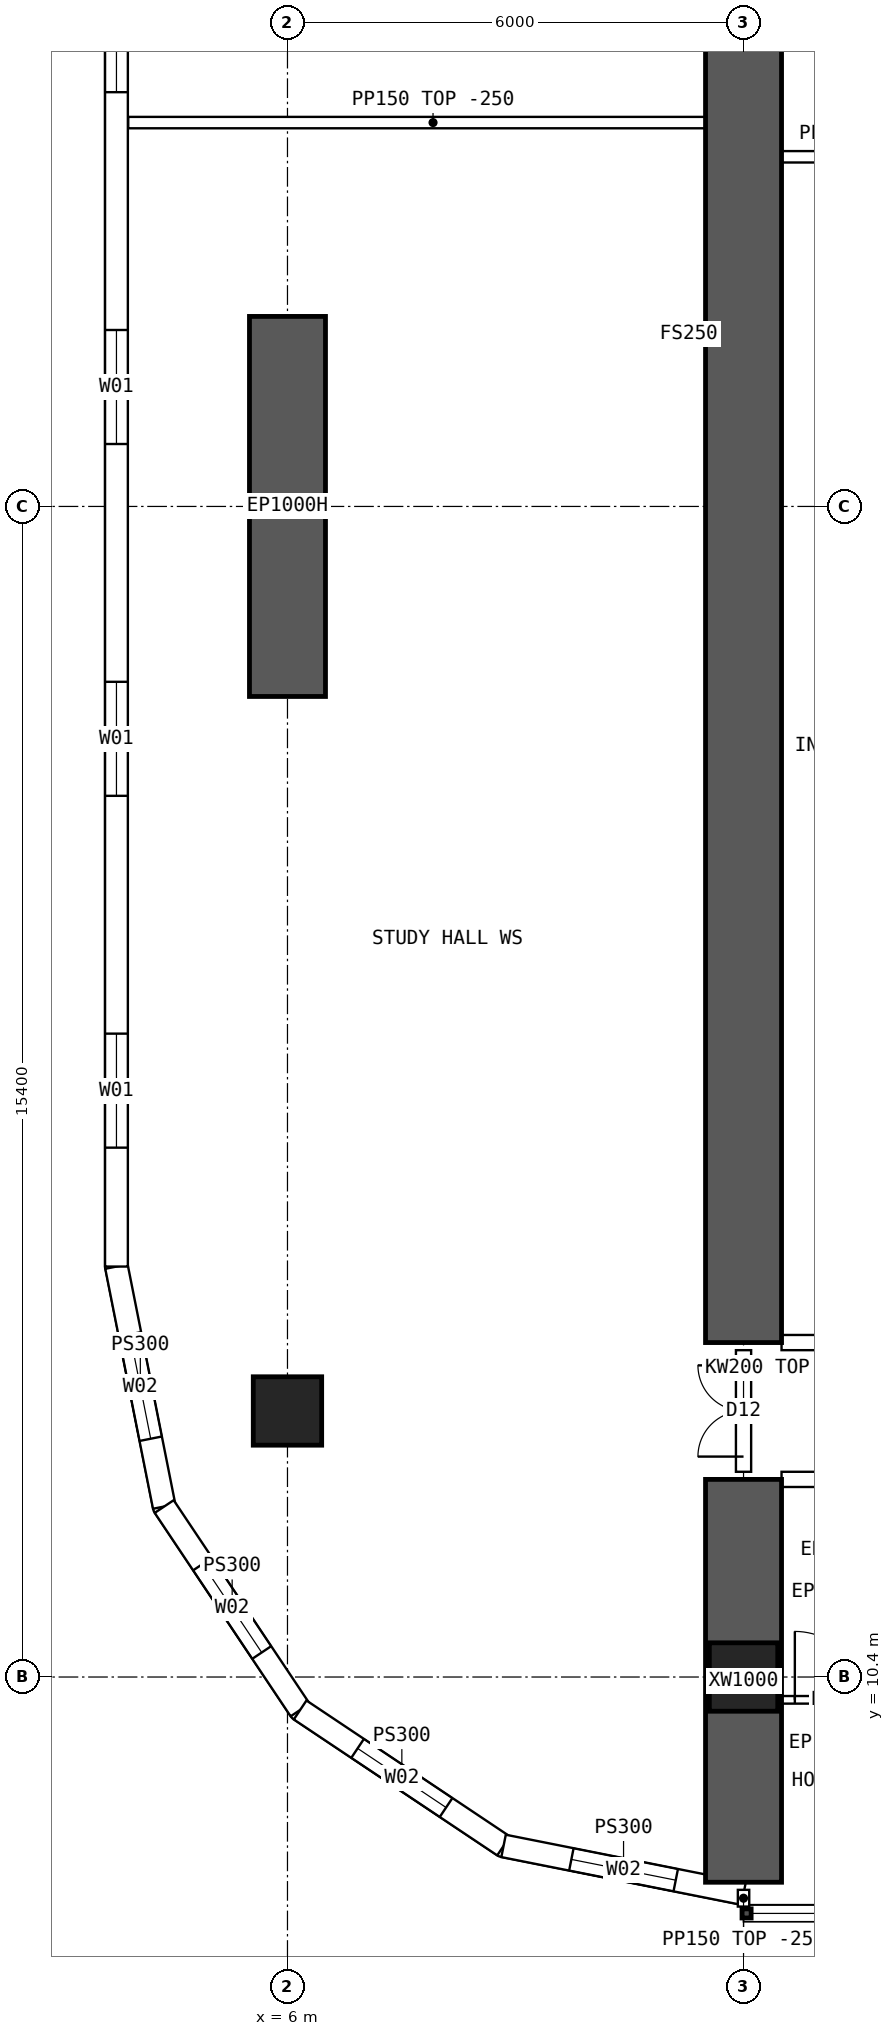
"""IFC4 building model, lengths in metres.
Left out: names, types, materials, properties, quantities, classifications, styles, units other than length and angle.
Written with IfcOpenShell. Run it as: python <this file> out.ifc"""

import sys

from ifc_helpers import new_model, si_unit, direction, frame, frame_2d, origin, origin_2d, place, context, subcontext, project, spatial, polyline, rectangle, hollow_rectangle, outline, extrude, element, fill, save


model = new_model("IFC4")
c1 = context("Model", 3, precision=1e-05, world=origin(), true_north=direction((0.0, 1.0)))
c2 = subcontext(c1, "Body", "Model", "MODEL_VIEW")
j1 = project(units=[si_unit("LENGTHUNIT", "METRE"), si_unit("PLANEANGLEUNIT", "RADIAN")], contexts=[c1])
p1 = place(None, origin())
s1 = spatial("IfcSite", under=j1, at=p1, CompositionType="ELEMENT")
p2 = place(p1, origin())
s2 = spatial("IfcBuilding", under=s1, at=p2, CompositionType="ELEMENT")
p3 = place(p2, frame((0.0, 0.0, 42.7)))
s3 = spatial("IfcBuildingStorey", under=s2, at=p3, CompositionType="ELEMENT", Elevation=42.7)
for number, where, z_axis, x_axis in (
    (1, (12.0, 10.4, 0.0), (0.0, 0.0, 1.0), (1.0, 0.0, 0.0)),
    (2, (6.0, 13.9, 0.0), (0.0, 0.0, 1.0), (1.0, 0.0, 0.0)),
):
    element("IfcColumn", number, at=place(p3, frame(where, z_axis=z_axis, x_axis=x_axis)), inside=s3, PredefinedType="COLUMN", context=c2, shape_type="SweptSolid", body=[
        extrude(hollow_rectangle(XDim=0.9, YDim=0.9, WallThickness=0.09, at=origin_2d()), origin(), (0.0, 0.0, 1.0), 3.75),
    ])
p4 = place(p3, frame((6.0, 23.3, 0.0), z_axis=(0.0, 0.0, 1.0), x_axis=(0.0, 1.0, 0.0)))
e3 = element("IfcWall", 3, at=p4, inside=s3, PredefinedType="SHEAR", context=c2, shape_type="SweptSolid", body=[
    extrude(rectangle(XDim=5.0, YDim=1.0, at=frame_2d((2.5, 0.0))), origin(), (0.0, 0.0, 1.0), 3.75),
])
p5 = place(p3, frame((12.0, 7.7, 0.0), z_axis=(0.0, 0.0, 1.0), x_axis=(0.0, 1.0, 0.0)))
e4 = element("IfcWall", 4, at=p5, inside=s3, PredefinedType="SHEAR", context=c2, shape_type="SweptSolid", body=[
    extrude(rectangle(XDim=5.3, YDim=1.0, at=frame_2d((2.65, 0.0))), origin(), (0.0, 0.0, 1.0), 3.75),
])
p6 = place(p3, frame((12.0, 14.8, 0.0), z_axis=(0.0, 0.0, 1.0), x_axis=(0.0, 1.0, 0.0)))
e5 = element("IfcWall", 5, at=p6, inside=s3, PredefinedType="SHEAR", context=c2, shape_type="SweptSolid", body=[
    extrude(rectangle(XDim=34.4, YDim=1.0, at=frame_2d((17.2, 0.0))), origin(), (0.0, 0.0, 1.0), 3.75),
])
p7 = place(p3, frame((3.75, 48.2, 0.0), z_axis=(0.0, 0.0, 1.0), x_axis=(0.0, -1.0, 0.0)))
e6 = element("IfcWall", 6, at=p7, inside=s3, PredefinedType="SOLIDWALL", context=c2, shape_type="SweptSolid", body=[
    extrude(outline(polyline([(-0.015, -0.15), (32.415, -0.15), (32.385, 0.15), (0.015, 0.15), (-0.015, -0.15)])), origin(), (0.0, 0.0, 1.0), 3.5),
])
p8 = place(p7, frame((1.564, 0.0, 0.9)))
e7 = element("IfcOpeningElement", 7, at=p8, cuts=e6, PredefinedType="OPENING", context=c2, shape_type="SweptSolid", body=[
    extrude(rectangle(XDim=1.5, YDim=2.0, at=frame_2d((0.75, 1.0))), frame((0.0, 0.16, 0.0), z_axis=(0.0, -1.0, 0.0), x_axis=(1.0, 0.0, 0.0)), (0.0, 0.0, 1.0), 0.32),
])
p9 = place(p7, frame((6.193, 0.0, 0.9)))
e8 = element("IfcOpeningElement", 8, at=p9, cuts=e6, PredefinedType="OPENING", context=c2, shape_type="SweptSolid", body=[
    extrude(rectangle(XDim=1.5, YDim=2.0, at=frame_2d((0.75, 1.0))), frame((0.0, 0.16, 0.0), z_axis=(0.0, -1.0, 0.0), x_axis=(1.0, 0.0, 0.0)), (0.0, 0.0, 1.0), 0.32),
])
p10 = place(p7, frame((10.822, 0.0, 0.9)))
e9 = element("IfcOpeningElement", 9, at=p10, cuts=e6, PredefinedType="OPENING", context=c2, shape_type="SweptSolid", body=[
    extrude(rectangle(XDim=1.5, YDim=2.0, at=frame_2d((0.75, 1.0))), frame((0.0, 0.16, 0.0), z_axis=(0.0, -1.0, 0.0), x_axis=(1.0, 0.0, 0.0)), (0.0, 0.0, 1.0), 0.32),
])
p11 = place(p7, frame((15.45, 0.0, 0.9)))
e10 = element("IfcOpeningElement", 10, at=p11, cuts=e6, PredefinedType="OPENING", context=c2, shape_type="SweptSolid", body=[
    extrude(rectangle(XDim=1.5, YDim=2.0, at=frame_2d((0.75, 1.0))), frame((0.0, 0.16, 0.0), z_axis=(0.0, -1.0, 0.0), x_axis=(1.0, 0.0, 0.0)), (0.0, 0.0, 1.0), 0.32),
])
p12 = place(p7, frame((20.079, 0.0, 0.9)))
e11 = element("IfcOpeningElement", 11, at=p12, cuts=e6, PredefinedType="OPENING", context=c2, shape_type="SweptSolid", body=[
    extrude(rectangle(XDim=1.5, YDim=2.0, at=frame_2d((0.75, 1.0))), frame((0.0, 0.16, 0.0), z_axis=(0.0, -1.0, 0.0), x_axis=(1.0, 0.0, 0.0)), (0.0, 0.0, 1.0), 0.32),
])
p13 = place(p7, frame((24.707, 0.0, 0.9)))
e12 = element("IfcOpeningElement", 12, at=p13, cuts=e6, PredefinedType="OPENING", context=c2, shape_type="SweptSolid", body=[
    extrude(rectangle(XDim=1.5, YDim=2.0, at=frame_2d((0.75, 1.0))), frame((0.0, 0.16, 0.0), z_axis=(0.0, -1.0, 0.0), x_axis=(1.0, 0.0, 0.0)), (0.0, 0.0, 1.0), 0.32),
])
p14 = place(p7, frame((29.336, 0.0, 0.9)))
e13 = element("IfcOpeningElement", 13, at=p14, cuts=e6, PredefinedType="OPENING", context=c2, shape_type="SweptSolid", body=[
    extrude(rectangle(XDim=1.5, YDim=2.0, at=frame_2d((0.75, 1.0))), frame((0.0, 0.16, 0.0), z_axis=(0.0, -1.0, 0.0), x_axis=(1.0, 0.0, 0.0)), (0.0, 0.0, 1.0), 0.32),
])
p15 = place(p3, frame((3.75, 15.8, 0.0), z_axis=(0.0, 0.0, 1.0), x_axis=(0.195065901187, -0.980790137692, 0.0)))
e14 = element("IfcWall", 14, at=p15, inside=s3, PredefinedType="SOLIDWALL", context=c2, shape_type="SweptSolid", body=[
    extrude(outline(polyline([(-0.015, -0.15), (3.249, -0.15), (3.189, 0.15), (0.015, 0.15), (-0.015, -0.15)])), origin(), (0.0, 0.0, 1.0), 3.5),
])
p16 = place(p15, frame((0.909, 0.0, 0.9)))
e15 = element("IfcOpeningElement", 15, at=p16, cuts=e14, PredefinedType="OPENING", context=c2, shape_type="SweptSolid", body=[
    extrude(rectangle(XDim=1.4, YDim=1.8, at=frame_2d((0.7, 0.9))), frame((0.0, 0.16, 0.0), z_axis=(0.0, -1.0, 0.0), x_axis=(1.0, 0.0, 0.0)), (0.0, 0.0, 1.0), 0.32),
])
p17 = place(p3, frame((4.378, 12.643, 0.0), z_axis=(0.0, 0.0, 1.0), x_axis=(0.555609954424, -0.831443069936, 0.0)))
e16 = element("IfcWall", 16, at=p17, inside=s3, PredefinedType="SOLIDWALL", context=c2, shape_type="SweptSolid", body=[
    extrude(outline(polyline([(-0.03, -0.15), (3.249, -0.15), (3.189, 0.15), (0.03, 0.15), (-0.03, -0.15)])), origin(), (0.0, 0.0, 1.0), 3.5),
])
p18 = place(p17, frame((0.909, 0.0, 0.9)))
e17 = element("IfcOpeningElement", 17, at=p18, cuts=e16, PredefinedType="OPENING", context=c2, shape_type="SweptSolid", body=[
    extrude(rectangle(XDim=1.4, YDim=1.8, at=frame_2d((0.7, 0.9))), frame((0.0, 0.16, 0.0), z_axis=(0.0, -1.0, 0.0), x_axis=(1.0, 0.0, 0.0)), (0.0, 0.0, 1.0), 0.32),
])
p19 = place(p3, frame((6.167, 9.966, 0.0), z_axis=(0.0, 0.0, 1.0), x_axis=(0.831478105043, -0.555557522525, 0.0)))
e18 = element("IfcWall", 18, at=p19, inside=s3, PredefinedType="SOLIDWALL", context=c2, shape_type="SweptSolid", body=[
    extrude(outline(polyline([(-0.03, -0.15), (3.249, -0.15), (3.189, 0.15), (0.03, 0.15), (-0.03, -0.15)])), origin(), (0.0, 0.0, 1.0), 3.5),
])
p20 = place(p19, frame((0.909, 0.0, 0.9)))
e19 = element("IfcOpeningElement", 19, at=p20, cuts=e18, PredefinedType="OPENING", context=c2, shape_type="SweptSolid", body=[
    extrude(rectangle(XDim=1.4, YDim=1.8, at=frame_2d((0.7, 0.9))), frame((0.0, 0.16, 0.0), z_axis=(0.0, -1.0, 0.0), x_axis=(1.0, 0.0, 0.0)), (0.0, 0.0, 1.0), 0.32),
])
p21 = place(p3, frame((8.843, 8.178, 0.0), z_axis=(0.0, 0.0, 1.0), x_axis=(0.980787251524, -0.195080412259, 0.0)))
e20 = element("IfcWall", 20, at=p21, inside=s3, PredefinedType="SOLIDWALL", context=c2, shape_type="SweptSolid", body=[
    extrude(outline(polyline([(-0.03, -0.15), (3.249, -0.15), (3.189, 0.15), (0.03, 0.15), (-0.03, -0.15)])), origin(), (0.0, 0.0, 1.0), 3.5),
])
p22 = place(p21, frame((0.909, 0.0, 0.9)))
e21 = element("IfcOpeningElement", 21, at=p22, cuts=e20, PredefinedType="OPENING", context=c2, shape_type="SweptSolid", body=[
    extrude(rectangle(XDim=1.4, YDim=1.8, at=frame_2d((0.7, 0.9))), frame((0.0, 0.16, 0.0), z_axis=(0.0, -1.0, 0.0), x_axis=(1.0, 0.0, 0.0)), (0.0, 0.0, 1.0), 0.32),
])
p23 = place(p3, frame((12.5, 13.0, 0.0), z_axis=(0.0, 0.0, 1.0), x_axis=(1.0, 0.0, 0.0)))
e22 = element("IfcWall", 22, at=p23, inside=s3, PredefinedType="SOLIDWALL", context=c2, shape_type="SweptSolid", body=[
    extrude(outline(polyline([(0.0, 0.0), (5.0, 0.0), (5.0, 3.1), (0.0, 3.1), (0.0, 0.0)])), frame((0.0, 0.1, 0.0), z_axis=(0.0, -1.0, 0.0), x_axis=(1.0, 0.0, 0.0)), (0.0, 0.0, 1.0), 0.2),
])
p24 = place(p23, frame((1.3, 0.0, 0.0)))
e23 = element("IfcOpeningElement", 23, at=p24, cuts=e22, PredefinedType="OPENING", context=c2, shape_type="SweptSolid", body=[
    extrude(rectangle(XDim=0.9, YDim=2.1, at=frame_2d((0.45, 1.05))), frame((0.0, 0.11, 0.0), z_axis=(0.0, -1.0, 0.0), x_axis=(1.0, 0.0, 0.0)), (0.0, 0.0, 1.0), 0.22),
])
p25 = place(p23, frame((2.675, 0.0, 0.0)))
e24 = element("IfcOpeningElement", 24, at=p25, cuts=e22, PredefinedType="OPENING", context=c2, shape_type="SweptSolid", body=[
    extrude(rectangle(XDim=0.9, YDim=2.1, at=frame_2d((0.45, 1.05))), frame((0.0, 0.11, 0.0), z_axis=(0.0, -1.0, 0.0), x_axis=(1.0, 0.0, 0.0)), (0.0, 0.0, 1.0), 0.22),
])
p26 = place(p3, frame((12.5, 14.8, 0.0), z_axis=(0.0, 0.0, 1.0), x_axis=(1.0, 0.0, 0.0)))
e25 = element("IfcWall", 25, at=p26, inside=s3, PredefinedType="SOLIDWALL", context=c2, shape_type="SweptSolid", body=[
    extrude(rectangle(XDim=5.0, YDim=0.2, at=frame_2d((2.5, 0.0))), origin(), (0.0, 0.0, 1.0), 3.5),
])
p27 = place(p26, frame((3.3, 0.0, 0.0)))
e26 = element("IfcOpeningElement", 26, at=p27, cuts=e25, PredefinedType="OPENING", context=c2, shape_type="SweptSolid", body=[
    extrude(rectangle(XDim=1.6, YDim=2.1, at=frame_2d((0.8, 1.05))), frame((0.0, 0.11, 0.0), z_axis=(0.0, -1.0, 0.0), x_axis=(1.0, 0.0, 0.0)), (0.0, 0.0, 1.0), 0.22),
])
p28 = place(p3, frame((13.75, 10.1, 0.0), z_axis=(0.0, 0.0, 1.0), x_axis=(-1.0, 0.0, 0.0)))
e27 = element("IfcWall", 27, at=p28, inside=s3, PredefinedType="PARTITIONING", context=c2, shape_type="SweptSolid", body=[
    extrude(rectangle(XDim=1.3, YDim=0.1, at=frame_2d((0.65, 0.0))), origin(), (0.0, 0.0, 1.0), 3.5),
])
p29 = place(p28, frame((0.175, 0.0, 0.0)))
e28 = element("IfcOpeningElement", 28, at=p29, cuts=e27, PredefinedType="OPENING", context=c2, shape_type="SweptSolid", body=[
    extrude(rectangle(XDim=0.9, YDim=2.1, at=frame_2d((0.45, 1.05))), frame((0.0, 0.06, 0.0), z_axis=(0.0, -1.0, 0.0), x_axis=(1.0, 0.0, 0.0)), (0.0, 0.0, 1.0), 0.12),
])
p30 = place(p3, frame((12.0, 30.4, 0.0), z_axis=(0.0, 0.0, 1.0), x_axis=(1.0, 0.0, 0.0)))
e29 = element("IfcWall", 29, at=p30, inside=s3, PredefinedType="PARTITIONING", context=c2, shape_type="SweptSolid", body=[
    extrude(rectangle(XDim=3.6, YDim=0.15, at=frame_2d((1.8, 0.0))), origin(), (0.0, 0.0, 1.0), 3.5),
])
p31 = place(p3, frame((3.905, 30.85, 0.0), z_axis=(0.0, 0.0, 1.0), x_axis=(1.0, 0.0, 0.0)))
e30 = element("IfcWall", 30, at=p31, inside=s3, PredefinedType="PARTITIONING", context=c2, shape_type="SweptSolid", body=[
    extrude(outline(polyline([(0.0, 0.0), (8.02, 0.0), (8.02, 3.5), (2.397, 3.5), (2.395, 3.05), (1.797, 3.05), (1.795, 3.5), (0.0, 3.5), (0.0, 0.0)])), frame((0.0, 0.075, 0.0), z_axis=(0.0, -1.0, 0.0), x_axis=(1.0, 0.0, 0.0)), (0.0, 0.0, 1.0), 0.15),
])
p32 = place(p3, frame((12.0, 13.1, 0.0), z_axis=(0.0, 0.0, 1.0), x_axis=(0.0, 1.0, 0.0)))
e31 = element("IfcWall", 31, at=p32, inside=s3, PredefinedType="SOLIDWALL", context=c2, shape_type="SweptSolid", body=[
    extrude(outline(polyline([(0.0, 0.0), (1.6, 0.0), (1.6, 3.05), (0.0, 3.05), (0.0, 0.0)])), frame((0.0, 0.1, 0.0), z_axis=(0.0, -1.0, 0.0), x_axis=(1.0, 0.0, 0.0)), (0.0, 0.0, 1.0), 0.2),
])
p33 = place(p32, frame((0.2, 0.0, 0.0)))
e32 = element("IfcOpeningElement", 32, at=p33, cuts=e31, PredefinedType="OPENING", context=c2, shape_type="SweptSolid", body=[
    extrude(rectangle(XDim=1.2, YDim=2.1, at=frame_2d((0.6, 1.05))), frame((0.0, 0.11, 0.0), z_axis=(0.0, -1.0, 0.0), x_axis=(1.0, 0.0, 0.0)), (0.0, 0.0, 1.0), 0.22),
])
p34 = place(p3, frame((12.0, 7.6, 0.0), z_axis=(0.0, 0.0, 1.0), x_axis=(0.0, -1.0, 0.0)))
e33 = element("IfcWall", 33, at=p34, inside=s3, PredefinedType="PARTITIONING", context=c2, shape_type="SweptSolid", body=[
    extrude(rectangle(XDim=0.22, YDim=0.15, at=frame_2d((0.11, 0.0))), origin(), (0.0, 0.0, 1.0), 3.5),
])
p35 = place(p11, origin())
e34 = element("IfcWindow", 34, at=p35, inside=s3, PartitioningType="SINGLE_PANEL", PredefinedType="WINDOW", context=c2, shape_type="SweptSolid", body=[
    extrude(rectangle(XDim=1.5, YDim=2.0, at=frame_2d((0.75, 1.0))), frame((0.0, 0.03, 0.0), z_axis=(0.0, -1.0, 0.0), x_axis=(1.0, 0.0, 0.0)), (0.0, 0.0, 1.0), 0.06),
])
fill(e10, e34)
p36 = place(p12, origin())
e35 = element("IfcWindow", 35, at=p36, inside=s3, PartitioningType="SINGLE_PANEL", PredefinedType="WINDOW", context=c2, shape_type="SweptSolid", body=[
    extrude(rectangle(XDim=1.5, YDim=2.0, at=frame_2d((0.75, 1.0))), frame((0.0, 0.03, 0.0), z_axis=(0.0, -1.0, 0.0), x_axis=(1.0, 0.0, 0.0)), (0.0, 0.0, 1.0), 0.06),
])
fill(e11, e35)
p37 = place(p13, origin())
e36 = element("IfcWindow", 36, at=p37, inside=s3, PartitioningType="SINGLE_PANEL", PredefinedType="WINDOW", context=c2, shape_type="SweptSolid", body=[
    extrude(rectangle(XDim=1.5, YDim=2.0, at=frame_2d((0.75, 1.0))), frame((0.0, 0.03, 0.0), z_axis=(0.0, -1.0, 0.0), x_axis=(1.0, 0.0, 0.0)), (0.0, 0.0, 1.0), 0.06),
])
fill(e12, e36)
p38 = place(p14, origin())
e37 = element("IfcWindow", 37, at=p38, inside=s3, PartitioningType="SINGLE_PANEL", PredefinedType="WINDOW", context=c2, shape_type="SweptSolid", body=[
    extrude(rectangle(XDim=1.5, YDim=2.0, at=frame_2d((0.75, 1.0))), frame((0.0, 0.03, 0.0), z_axis=(0.0, -1.0, 0.0), x_axis=(1.0, 0.0, 0.0)), (0.0, 0.0, 1.0), 0.06),
])
fill(e13, e37)
p39 = place(p16, origin())
e38 = element("IfcWindow", 38, at=p39, inside=s3, PartitioningType="SINGLE_PANEL", PredefinedType="WINDOW", context=c2, shape_type="SweptSolid", body=[
    extrude(rectangle(XDim=1.4, YDim=1.8, at=frame_2d((0.7, 0.9))), frame((0.0, 0.03, 0.0), z_axis=(0.0, -1.0, 0.0), x_axis=(1.0, 0.0, 0.0)), (0.0, 0.0, 1.0), 0.06),
])
fill(e15, e38)
p40 = place(p18, origin())
e39 = element("IfcWindow", 39, at=p40, inside=s3, PartitioningType="SINGLE_PANEL", PredefinedType="WINDOW", context=c2, shape_type="SweptSolid", body=[
    extrude(rectangle(XDim=1.4, YDim=1.8, at=frame_2d((0.7, 0.9))), frame((0.0, 0.03, 0.0), z_axis=(0.0, -1.0, 0.0), x_axis=(1.0, 0.0, 0.0)), (0.0, 0.0, 1.0), 0.06),
])
fill(e17, e39)
p41 = place(p20, origin())
e40 = element("IfcWindow", 40, at=p41, inside=s3, PartitioningType="SINGLE_PANEL", PredefinedType="WINDOW", context=c2, shape_type="SweptSolid", body=[
    extrude(rectangle(XDim=1.4, YDim=1.8, at=frame_2d((0.7, 0.9))), frame((0.0, 0.03, 0.0), z_axis=(0.0, -1.0, 0.0), x_axis=(1.0, 0.0, 0.0)), (0.0, 0.0, 1.0), 0.06),
])
fill(e19, e40)
p42 = place(p22, origin())
e41 = element("IfcWindow", 41, at=p42, inside=s3, PartitioningType="SINGLE_PANEL", PredefinedType="WINDOW", context=c2, shape_type="SweptSolid", body=[
    extrude(rectangle(XDim=1.4, YDim=1.8, at=frame_2d((0.7, 0.9))), frame((0.0, 0.03, 0.0), z_axis=(0.0, -1.0, 0.0), x_axis=(1.0, 0.0, 0.0)), (0.0, 0.0, 1.0), 0.06),
])
fill(e21, e41)
p43 = place(p29, origin())
e42 = element("IfcDoor", 42, at=p43, inside=s3, OperationType="SINGLE_SWING_RIGHT", PredefinedType="DOOR", context=c2, shape_type="SweptSolid", body=[
    extrude(rectangle(XDim=0.9, YDim=2.1, at=frame_2d((0.45, 1.05))), frame((0.0, 0.025, 0.0), z_axis=(0.0, -1.0, 0.0), x_axis=(1.0, 0.0, 0.0)), (0.0, 0.0, 1.0), 0.05),
])
fill(e28, e42)
p44 = place(p33, origin())
e43 = element("IfcDoor", 43, at=p44, inside=s3, OperationType="DOUBLE_DOOR_SINGLE_SWING", PredefinedType="DOOR", context=c2, shape_type="SweptSolid", body=[
    extrude(rectangle(XDim=1.2, YDim=2.1, at=frame_2d((0.6, 1.05))), frame((0.0, 0.025, 0.0), z_axis=(0.0, -1.0, 0.0), x_axis=(1.0, 0.0, 0.0)), (0.0, 0.0, 1.0), 0.05),
])
fill(e32, e43)
save(model, sys.argv[1])
